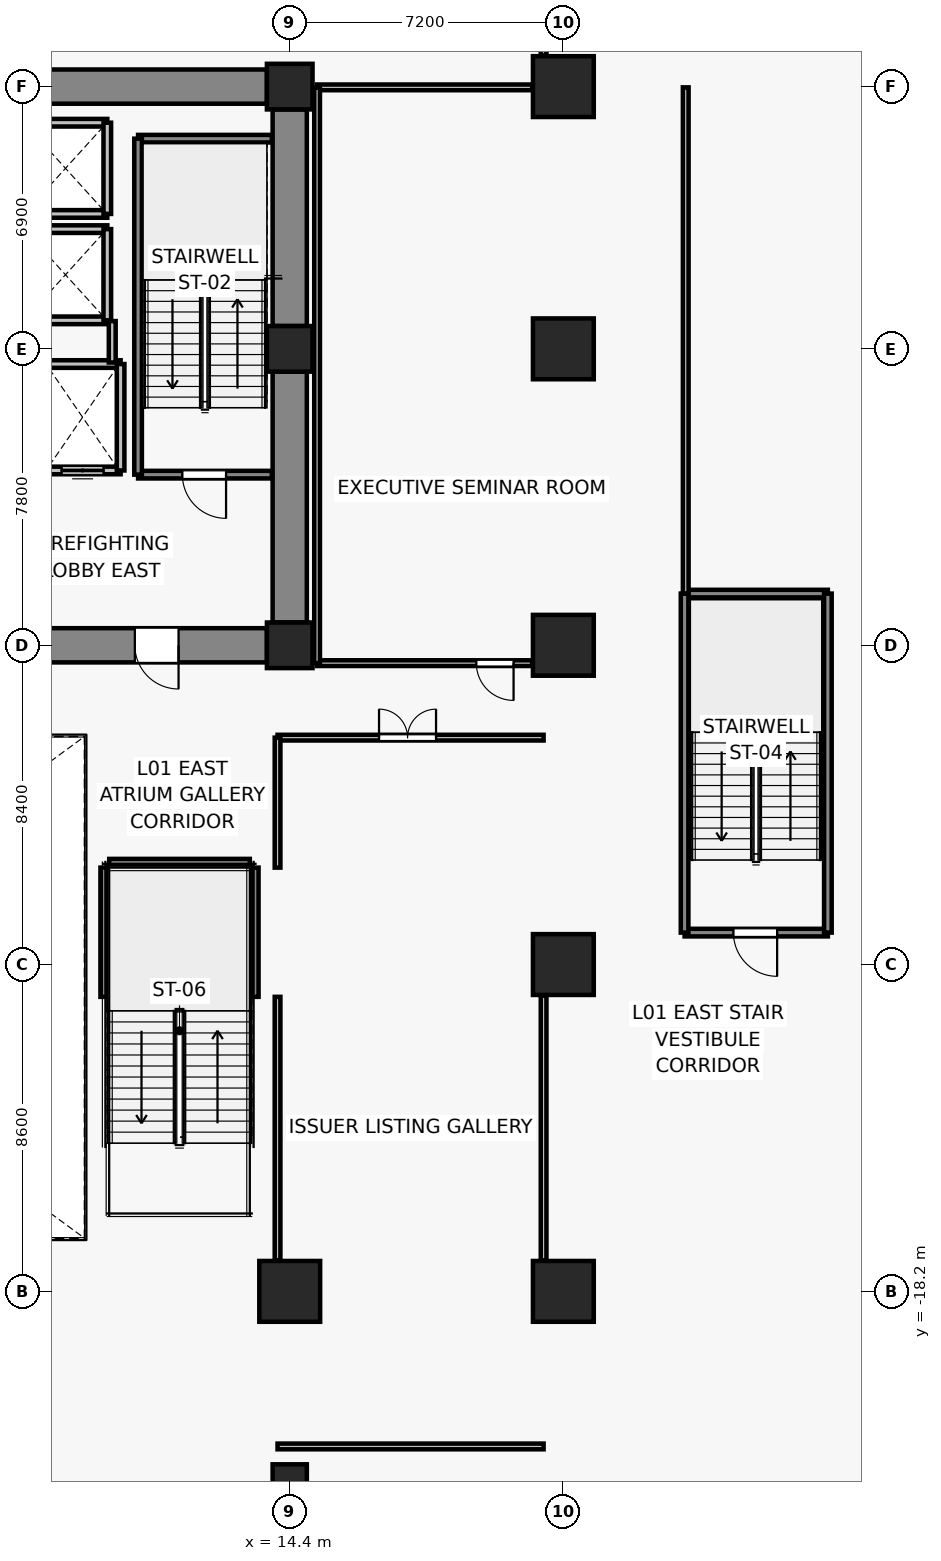
"""IFC4 building model, lengths in metres.
Left out: names, types, materials, properties, quantities, classifications, styles, units other than length and angle.
Written with IfcOpenShell. Run it as: python <this file> out.ifc"""

import sys

from ifc_helpers import new_model, si_unit, direction, frame, frame_2d, origin, origin_2d, place, context, subcontext, project, spatial, rectangle, extrude, source, transform, mapped, element, fill, save


model = new_model("IFC4")
c1 = context("Model", 3, precision=1e-05, world=origin(), true_north=direction((0.0, 1.0)))
c2 = subcontext(c1, "Body", "Model", "MODEL_VIEW")
j1 = project(units=[si_unit("LENGTHUNIT", "METRE"), si_unit("PLANEANGLEUNIT", "RADIAN")], contexts=[c1])
p1 = place(None, origin())
s1 = spatial("IfcSite", under=j1, at=p1, CompositionType="ELEMENT")
p2 = place(p1, origin())
s2 = spatial("IfcBuilding", under=s1, at=p2, CompositionType="ELEMENT")
p3 = place(p2, frame((0.0, 0.0, 5.0)))
s3 = spatial("IfcBuildingStorey", under=s2, at=p3, CompositionType="ELEMENT", Elevation=5.0)
for number, where, z_axis, x_axis in (
    (1, (14.4, -1.2, 0.0), (0.0, 0.0, 1.0), (1.0, 0.0, 0.0)),
    (2, (14.4, 6.6, 0.0), (0.0, 0.0, 1.0), (1.0, 0.0, 0.0)),
    (3, (14.4, 13.5, 0.0), (0.0, 0.0, 1.0), (1.0, 0.0, 0.0)),
):
    element("IfcColumn", number, at=place(p3, frame(where, z_axis=z_axis, x_axis=x_axis)), inside=s3, PredefinedType="COLUMN", context=c2, shape_type="SweptSolid", body=[
        extrude(rectangle(XDim=1.2, YDim=1.2, at=origin_2d()), origin(), (0.0, 0.0, 1.0), 4.4),
    ])
for number, where, z_axis, x_axis in (
    (4, (14.4, -18.2, 0.0), (0.0, 0.0, 1.0), (1.0, 0.0, 0.0)),
    (5, (21.6, -18.2, 0.0), (0.0, 0.0, 1.0), (1.0, 0.0, 0.0)),
    (6, (21.6, -9.6, 0.0), (0.0, 0.0, 1.0), (1.0, 0.0, 0.0)),
    (7, (21.6, -1.2, 0.0), (0.0, 0.0, 1.0), (1.0, 0.0, 0.0)),
    (8, (21.6, 6.6, 0.0), (0.0, 0.0, 1.0), (1.0, 0.0, 0.0)),
    (9, (21.6, 13.5, 0.0), (0.0, 0.0, 1.0), (1.0, 0.0, 0.0)),
):
    element("IfcColumn", number, at=place(p3, frame(where, z_axis=z_axis, x_axis=x_axis)), inside=s3, PredefinedType="COLUMN", context=c2, shape_type="SweptSolid", body=[
        extrude(rectangle(XDim=1.6, YDim=1.6, at=origin_2d()), origin(), (0.0, 0.0, 1.0), 4.4),
    ])
p4 = place(p3, frame((14.4, -23.2, 0.0), z_axis=(0.0, 0.0, 1.0), x_axis=(1.0, 0.0, 0.0)))
e10 = element("IfcColumn", 10, at=p4, inside=s3, PredefinedType="COLUMN", context=c2, shape_type="SweptSolid", body=[
    extrude(rectangle(XDim=0.9, YDim=0.9, at=origin_2d()), origin(), (0.0, 0.0, 1.0), 4.4),
])
p5 = place(p3, frame((7.8, 13.5, 0.0), z_axis=(0.0, 0.0, 1.0), x_axis=(1.0, 0.0, 0.0)))
e11 = element("IfcWall", 11, at=p5, inside=s3, PredefinedType="SHEAR", context=c2, shape_type="SweptSolid", body=[
    extrude(rectangle(XDim=6.0, YDim=0.9, at=frame_2d((3.0, 0.0))), origin(), (0.0, 0.0, 1.0), 4.1),
])
p6 = place(p3, frame((14.4, -0.6, 0.0), z_axis=(0.0, 0.0, 1.0), x_axis=(0.0, 1.0, 0.0)))
e12 = element("IfcWall", 12, at=p6, inside=s3, PredefinedType="SHEAR", context=c2, shape_type="SweptSolid", body=[
    extrude(rectangle(XDim=6.6, YDim=0.9, at=frame_2d((3.3, 0.0))), origin(), (0.0, 0.0, 1.0), 4.1),
])
p7 = place(p3, frame((14.4, 7.2, 0.0), z_axis=(0.0, 0.0, 1.0), x_axis=(0.0, 1.0, 0.0)))
e13 = element("IfcWall", 13, at=p7, inside=s3, PredefinedType="SHEAR", context=c2, shape_type="SweptSolid", body=[
    extrude(rectangle(XDim=5.7, YDim=0.9, at=frame_2d((2.85, 0.0))), origin(), (0.0, 0.0, 1.0), 4.1),
])
p8 = place(p3, frame((13.8, -1.2, 0.0), z_axis=(0.0, 0.0, 1.0), x_axis=(-1.0, 0.0, 0.0)))
e14 = element("IfcWall", 14, at=p8, inside=s3, PredefinedType="SHEAR", context=c2, shape_type="SweptSolid", body=[
    extrude(rectangle(XDim=6.0, YDim=0.9, at=frame_2d((3.0, 0.0))), origin(), (0.0, 0.0, 1.0), 4.1),
])
p9 = place(p8, frame((2.325, 0.0, 0.0)))
e15 = element("IfcOpeningElement", 15, at=p9, cuts=e14, PredefinedType="OPENING", context=c2, shape_type="SweptSolid", body=[
    extrude(rectangle(XDim=1.15, YDim=2.15, at=frame_2d((0.575, 1.075))), frame((0.0, 0.46, 0.0), z_axis=(0.0, -1.0, 0.0), x_axis=(1.0, 0.0, 0.0)), (0.0, 0.0, 1.0), 0.92),
])
for number, where, z_axis, x_axis in (
    (16, (9.52, -10.45, 0.0), (0.0, 0.0, 1.0), (0.0, 1.0, 0.0)),
    (17, (13.48, -7.05, 0.0), (0.0, 0.0, 1.0), (0.0, -1.0, 0.0)),
):
    element("IfcWall", number, at=place(p3, frame(where, z_axis=z_axis, x_axis=x_axis)), inside=s3, PredefinedType="SOLIDWALL", context=c2, shape_type="SweptSolid", body=[
        extrude(rectangle(XDim=3.4, YDim=0.2, at=frame_2d((1.7, 0.0))), origin(), (0.0, 0.0, 1.0), 4.1),
    ])
p10 = place(p3, frame((9.65, -6.92, 0.0), z_axis=(0.0, 0.0, 1.0), x_axis=(1.0, 0.0, 0.0)))
e18 = element("IfcWall", 18, at=p10, inside=s3, PredefinedType="SOLIDWALL", context=c2, shape_type="SweptSolid", body=[
    extrude(rectangle(XDim=3.7, YDim=0.2, at=frame_2d((1.85, 0.0))), origin(), (0.0, 0.0, 1.0), 4.1),
])
p11 = place(p3, frame((9.95, 3.4, 0.0), z_axis=(0.0, 0.0, 1.0), x_axis=(-1.0, 0.0, 0.0)))
e19 = element("IfcWall", 19, at=p11, inside=s3, PredefinedType="SOLIDWALL", context=c2, shape_type="SweptSolid", body=[
    extrude(rectangle(XDim=2.0, YDim=0.2, at=frame_2d((1.0, 0.0))), origin(), (0.0, 0.0, 1.0), 4.1),
])
p12 = place(p11, frame((0.45, 0.0, 0.0)))
e20 = element("IfcOpeningElement", 20, at=p12, cuts=e19, PredefinedType="OPENING", context=c2, shape_type="SweptSolid", body=[
    extrude(rectangle(XDim=1.1, YDim=2.2, at=frame_2d((0.55, 1.1))), frame((0.0, 0.11, 0.0), z_axis=(0.0, -1.0, 0.0), x_axis=(1.0, 0.0, 0.0)), (0.0, 0.0, 1.0), 0.22),
])
p13 = place(p3, frame((7.95, 6.2, 0.0), z_axis=(0.0, 0.0, 1.0), x_axis=(1.0, 0.0, 0.0)))
e21 = element("IfcWall", 21, at=p13, inside=s3, PredefinedType="SOLIDWALL", context=c2, shape_type="SweptSolid", body=[
    extrude(rectangle(XDim=2.0, YDim=0.2, at=frame_2d((1.0, 0.0))), origin(), (0.0, 0.0, 1.0), 4.1),
])
p14 = place(p3, frame((9.95, 6.2, 0.0), z_axis=(0.0, 0.0, 1.0), x_axis=(0.0, -1.0, 0.0)))
e22 = element("IfcWall", 22, at=p14, inside=s3, PredefinedType="SOLIDWALL", context=c2, shape_type="SweptSolid", body=[
    extrude(rectangle(XDim=2.8, YDim=0.2, at=frame_2d((1.4, 0.0))), origin(), (0.0, 0.0, 1.0), 4.1),
])
for number, where, z_axis, x_axis in (
    (23, (9.6, 7.35, 0.0), (0.0, 0.0, 1.0), (-1.0, 0.0, 0.0)),
    (24, (7.4, 9.75, 0.0), (0.0, 0.0, 1.0), (1.0, 0.0, 0.0)),
):
    element("IfcWall", number, at=place(p3, frame(where, z_axis=z_axis, x_axis=x_axis)), inside=s3, PredefinedType="SOLIDWALL", context=c2, shape_type="SweptSolid", body=[
        extrude(rectangle(XDim=2.2, YDim=0.2, at=frame_2d((1.1, 0.0))), origin(), (0.0, 0.0, 1.0), 3.19),
    ])
p15 = place(p3, frame((9.6, 9.75, 0.0), z_axis=(0.0, 0.0, 1.0), x_axis=(0.0, -1.0, 0.0)))
e25 = element("IfcWall", 25, at=p15, inside=s3, PredefinedType="SOLIDWALL", context=c2, shape_type="SweptSolid", body=[
    extrude(rectangle(XDim=2.4, YDim=0.2, at=frame_2d((1.2, 0.0))), origin(), (0.0, 0.0, 1.0), 4.1),
])
for number, where, z_axis, x_axis in (
    (26, (9.6, 10.15, 0.0), (0.0, 0.0, 1.0), (-1.0, 0.0, 0.0)),
    (27, (7.4, 12.55, 0.0), (0.0, 0.0, 1.0), (1.0, 0.0, 0.0)),
):
    element("IfcWall", number, at=place(p3, frame(where, z_axis=z_axis, x_axis=x_axis)), inside=s3, PredefinedType="SOLIDWALL", context=c2, shape_type="SweptSolid", body=[
        extrude(rectangle(XDim=2.2, YDim=0.2, at=frame_2d((1.1, 0.0))), origin(), (0.0, 0.0, 1.0), 3.19),
    ])
p16 = place(p3, frame((9.6, 12.55, 0.0), z_axis=(0.0, 0.0, 1.0), x_axis=(0.0, -1.0, 0.0)))
e28 = element("IfcWall", 28, at=p16, inside=s3, PredefinedType="SOLIDWALL", context=c2, shape_type="SweptSolid", body=[
    extrude(rectangle(XDim=2.4, YDim=0.2, at=frame_2d((1.2, 0.0))), origin(), (0.0, 0.0, 1.0), 4.1),
])
p17 = place(p3, frame((13.93, 3.29, 0.0), z_axis=(0.0, 0.0, 1.0), x_axis=(-1.0, 0.0, 0.0)))
e29 = element("IfcWall", 29, at=p17, inside=s3, PredefinedType="SOLIDWALL", context=c2, shape_type="SweptSolid", body=[
    extrude(rectangle(XDim=3.52, YDim=0.2, at=frame_2d((1.76, 0.0))), origin(), (0.0, 0.0, 1.0), 4.1),
])
p18 = place(p17, frame((1.205, 0.0, 0.0)))
e30 = element("IfcOpeningElement", 30, at=p18, cuts=e29, PredefinedType="OPENING", context=c2, shape_type="SweptSolid", body=[
    extrude(rectangle(XDim=1.15, YDim=2.15, at=frame_2d((0.575, 1.075))), frame((0.0, 0.11, 0.0), z_axis=(0.0, -1.0, 0.0), x_axis=(1.0, 0.0, 0.0)), (0.0, 0.0, 1.0), 0.22),
])
p19 = place(p3, frame((10.41, 12.13, 0.0), z_axis=(0.0, 0.0, 1.0), x_axis=(1.0, 0.0, 0.0)))
e31 = element("IfcWall", 31, at=p19, inside=s3, PredefinedType="SOLIDWALL", context=c2, shape_type="SweptSolid", body=[
    extrude(rectangle(XDim=3.52, YDim=0.2, at=frame_2d((1.76, 0.0))), origin(), (0.0, 0.0, 1.0), 4.1),
])
p20 = place(p3, frame((10.41, 3.29, 0.0), z_axis=(0.0, 0.0, 1.0), x_axis=(0.0, 1.0, 0.0)))
e32 = element("IfcWall", 32, at=p20, inside=s3, PredefinedType="SOLIDWALL", context=c2, shape_type="SweptSolid", body=[
    extrude(rectangle(XDim=8.84, YDim=0.2, at=frame_2d((4.42, 0.0))), origin(), (0.0, 0.0, 1.0), 4.1),
])
p21 = place(p3, frame((9.73, 7.33, 0.0), z_axis=(0.0, 0.0, 1.0), x_axis=(0.0, -1.0, 0.0)))
e33 = element("IfcWall", 33, at=p21, inside=s3, PredefinedType="PARTITIONING", context=c2, shape_type="SweptSolid", body=[
    extrude(rectangle(XDim=1.09, YDim=0.18, at=frame_2d((0.545, 0.0))), origin(), (0.0, 0.0, 1.0), 4.1),
])
p22 = place(p3, frame((28.56, -8.76, 0.0), z_axis=(0.0, 0.0, 1.0), x_axis=(-1.0, 0.0, 0.0)))
e34 = element("IfcWall", 34, at=p22, inside=s3, PredefinedType="SOLIDWALL", context=c2, shape_type="SweptSolid", body=[
    extrude(rectangle(XDim=3.77, YDim=0.2, at=frame_2d((1.885, 0.0))), origin(), (0.0, 0.0, 1.0), 4.1),
])
p23 = place(p22, frame((1.335, 0.0, 0.0)))
e35 = element("IfcOpeningElement", 35, at=p23, cuts=e34, PredefinedType="OPENING", context=c2, shape_type="SweptSolid", body=[
    extrude(rectangle(XDim=1.15, YDim=2.15, at=frame_2d((0.575, 1.075))), frame((0.0, 0.11, 0.0), z_axis=(0.0, -1.0, 0.0), x_axis=(1.0, 0.0, 0.0)), (0.0, 0.0, 1.0), 0.22),
])
p24 = place(p3, frame((24.79, 0.16, 0.0), z_axis=(0.0, 0.0, 1.0), x_axis=(1.0, 0.0, 0.0)))
e36 = element("IfcWall", 36, at=p24, inside=s3, PredefinedType="SOLIDWALL", context=c2, shape_type="SweptSolid", body=[
    extrude(rectangle(XDim=3.77, YDim=0.2, at=frame_2d((1.885, 0.0))), origin(), (0.0, 0.0, 1.0), 4.1),
])
for number, where, z_axis, x_axis in (
    (37, (24.79, -8.76, 0.0), (0.0, 0.0, 1.0), (0.0, 1.0, 0.0)),
    (38, (28.56, 0.16, 0.0), (0.0, 0.0, 1.0), (0.0, -1.0, 0.0)),
):
    element("IfcWall", number, at=place(p3, frame(where, z_axis=z_axis, x_axis=x_axis)), inside=s3, PredefinedType="SOLIDWALL", context=c2, shape_type="SweptSolid", body=[
        extrude(rectangle(XDim=8.92, YDim=0.2, at=frame_2d((4.46, 0.0))), origin(), (0.0, 0.0, 1.0), 4.1),
    ])
p25 = place(p3, frame((21.08, -22.28, 0.0), z_axis=(0.0, 0.0, 1.0), x_axis=(-1.0, 0.0, 0.0)))
e39 = element("IfcWall", 39, at=p25, inside=s3, PredefinedType="PARTITIONING", context=c2, shape_type="SweptSolid", body=[
    extrude(rectangle(XDim=7.0, YDim=0.15, at=frame_2d((3.5, 0.0))), origin(), (0.0, 0.0, 1.0), 3.19),
])
p26 = place(p3, frame((14.08, -3.63, 0.0), z_axis=(0.0, 0.0, 1.0), x_axis=(1.0, 0.0, 0.0)))
e40 = element("IfcWall", 40, at=p26, inside=s3, PredefinedType="PARTITIONING", context=c2, shape_type="SweptSolid", body=[
    extrude(rectangle(XDim=7.0, YDim=0.15, at=frame_2d((3.5, 0.0))), origin(), (0.0, 0.0, 1.0), 3.239),
])
p27 = place(p26, frame((2.67, 0.0, 0.0)))
e41 = element("IfcOpeningElement", 41, at=p27, cuts=e40, PredefinedType="OPENING", context=c2, shape_type="SweptSolid", body=[
    extrude(rectangle(XDim=1.5, YDim=2.2, at=frame_2d((0.75, 1.1))), frame((0.0, 0.085, 0.0), z_axis=(0.0, -1.0, 0.0), x_axis=(1.0, 0.0, 0.0)), (0.0, 0.0, 1.0), 0.17),
])
p28 = place(p3, frame((14.08, -17.38, 0.0), z_axis=(0.0, 0.0, 1.0), x_axis=(0.0, 1.0, 0.0)))
e42 = element("IfcWall", 42, at=p28, inside=s3, PredefinedType="PARTITIONING", context=c2, shape_type="SweptSolid", body=[
    extrude(rectangle(XDim=6.93, YDim=0.15, at=frame_2d((3.465, 0.0))), origin(), (0.0, 0.0, 1.0), 3.29),
])
p29 = place(p3, frame((14.08, -7.05, 0.0), z_axis=(0.0, 0.0, 1.0), x_axis=(0.0, 1.0, 0.0)))
e43 = element("IfcWall", 43, at=p29, inside=s3, PredefinedType="PARTITIONING", context=c2, shape_type="SweptSolid", body=[
    extrude(rectangle(XDim=3.42, YDim=0.15, at=frame_2d((1.71, 0.0))), origin(), (0.0, 0.0, 1.0), 3.29),
])
p30 = place(p3, frame((21.08, -10.42, 0.0), z_axis=(0.0, 0.0, 1.0), x_axis=(0.0, -1.0, 0.0)))
e44 = element("IfcWall", 44, at=p30, inside=s3, PredefinedType="PARTITIONING", context=c2, shape_type="SweptSolid", body=[
    extrude(rectangle(XDim=6.96, YDim=0.15, at=frame_2d((3.48, 0.0))), origin(), (0.0, 0.0, 1.0), 3.29),
])
p31 = place(p3, frame((20.78, -1.67, 0.0), z_axis=(0.0, 0.0, 1.0), x_axis=(-1.0, 0.0, 0.0)))
e45 = element("IfcWall", 45, at=p31, inside=s3, PredefinedType="PARTITIONING", context=c2, shape_type="SweptSolid", body=[
    extrude(rectangle(XDim=5.66, YDim=0.15, at=frame_2d((2.83, 0.0))), origin(), (0.0, 0.0, 1.0), 4.1),
])
p32 = place(p31, frame((0.49, 0.0, 0.0)))
e46 = element("IfcOpeningElement", 46, at=p32, cuts=e45, PredefinedType="OPENING", context=c2, shape_type="SweptSolid", body=[
    extrude(rectangle(XDim=0.98, YDim=2.15, at=frame_2d((0.49, 1.075))), frame((0.0, 0.085, 0.0), z_axis=(0.0, -1.0, 0.0), x_axis=(1.0, 0.0, 0.0)), (0.0, 0.0, 1.0), 0.17),
])
p33 = place(p3, frame((15.12, 13.48, 0.0), z_axis=(0.0, 0.0, 1.0), x_axis=(1.0, 0.0, 0.0)))
e47 = element("IfcWall", 47, at=p33, inside=s3, PredefinedType="PARTITIONING", context=c2, shape_type="SweptSolid", body=[
    extrude(rectangle(XDim=5.66, YDim=0.15, at=frame_2d((2.83, 0.0))), origin(), (0.0, 0.0, 1.0), 3.19),
])
p34 = place(p3, frame((15.12, -1.67, 0.0), z_axis=(0.0, 0.0, 1.0), x_axis=(0.0, 1.0, 0.0)))
e48 = element("IfcWall", 48, at=p34, inside=s3, PredefinedType="PARTITIONING", context=c2, shape_type="SweptSolid", body=[
    extrude(rectangle(XDim=15.15, YDim=0.15, at=frame_2d((7.575, 0.0))), origin(), (0.0, 0.0, 1.0), 3.19),
])
p35 = place(p3, frame((24.82, 13.48, 0.0), z_axis=(0.0, 0.0, 1.0), x_axis=(0.0, -1.0, 0.0)))
e49 = element("IfcWall", 49, at=p35, inside=s3, PredefinedType="PARTITIONING", context=c2, shape_type="SweptSolid", body=[
    extrude(rectangle(XDim=13.32, YDim=0.15, at=frame_2d((6.66, 0.0))), origin(), (0.0, 0.0, 1.0), 3.19),
])
p36 = place(p3, frame((21.08, 22.88, 0.0), z_axis=(0.0, 0.0, 1.0), x_axis=(0.0, -1.0, 0.0)))
e50 = element("IfcWall", 50, at=p36, inside=s3, PredefinedType="PARTITIONING", context=c2, shape_type="SweptSolid", body=[
    extrude(rectangle(XDim=8.56, YDim=0.15, at=frame_2d((4.28, 0.0))), origin(), (0.0, 0.0, 1.0), 3.19),
])
m1 = source(origin(), c2, "Body", "SweptSolid", [
    extrude(rectangle(XDim=1.1, YDim=2.2, at=frame_2d((0.55, 1.1))), frame((0.0, 0.025, 0.0), z_axis=(0.0, -1.0, 0.0), x_axis=(1.0, 0.0, 0.0)), (0.0, 0.0, 1.0), 0.05),
])
p37 = place(p12, origin())
e51 = element("IfcDoor", 51, at=p37, inside=s3, OperationType="DOUBLE_DOOR_SLIDING", PredefinedType="DOOR", context=c2, shape_type="MappedRepresentation", body=[
    mapped(m1, transform((0.0, 0.0, 0.0), x_axis=(1.0, 0.0, 0.0), y_axis=(0.0, 1.0, 0.0), z_axis=(0.0, 0.0, 1.0), scale=1.0)),
])
fill(e20, e51)
m2 = source(origin(), c2, "Body", "SweptSolid", [
    extrude(rectangle(XDim=1.15, YDim=2.15, at=frame_2d((0.575, 1.075))), frame((0.0, 0.025, 0.0), z_axis=(0.0, -1.0, 0.0), x_axis=(1.0, 0.0, 0.0)), (0.0, 0.0, 1.0), 0.05),
])
p38 = place(p18, origin())
e52 = element("IfcDoor", 52, at=p38, inside=s3, OperationType="SINGLE_SWING_LEFT", PredefinedType="DOOR", context=c2, shape_type="MappedRepresentation", body=[
    mapped(m2, transform((0.0, 0.0, 0.0), x_axis=(1.0, 0.0, 0.0), y_axis=(0.0, 1.0, 0.0), z_axis=(0.0, 0.0, 1.0), scale=1.0)),
])
fill(e30, e52)
p39 = place(p9, origin())
e53 = element("IfcDoor", 53, at=p39, inside=s3, OperationType="SINGLE_SWING_LEFT", PredefinedType="DOOR", context=c2, shape_type="MappedRepresentation", body=[
    mapped(m2, transform((0.0, 0.0, 0.0), x_axis=(1.0, 0.0, 0.0), y_axis=(0.0, 1.0, 0.0), z_axis=(0.0, 0.0, 1.0), scale=1.0)),
])
fill(e15, e53)
p40 = place(p23, origin())
e54 = element("IfcDoor", 54, at=p40, inside=s3, OperationType="SINGLE_SWING_LEFT", PredefinedType="DOOR", context=c2, shape_type="MappedRepresentation", body=[
    mapped(m2, transform((0.0, 0.0, 0.0), x_axis=(1.0, 0.0, 0.0), y_axis=(0.0, 1.0, 0.0), z_axis=(0.0, 0.0, 1.0), scale=1.0)),
])
fill(e35, e54)
m3 = source(origin(), c2, "Body", "SweptSolid", [
    extrude(rectangle(XDim=1.5, YDim=2.2, at=frame_2d((0.75, 1.1))), frame((0.0, 0.025, 0.0), z_axis=(0.0, -1.0, 0.0), x_axis=(1.0, 0.0, 0.0)), (0.0, 0.0, 1.0), 0.05),
])
p41 = place(p27, origin())
e55 = element("IfcDoor", 55, at=p41, inside=s3, OperationType="DOUBLE_DOOR_SINGLE_SWING", PredefinedType="DOOR", context=c2, shape_type="MappedRepresentation", body=[
    mapped(m3, transform((0.0, 0.0, 0.0), x_axis=(1.0, 0.0, 0.0), y_axis=(0.0, 1.0, 0.0), z_axis=(0.0, 0.0, 1.0), scale=1.0)),
])
fill(e41, e55)
m4 = source(origin(), c2, "Body", "SweptSolid", [
    extrude(rectangle(XDim=0.98, YDim=2.15, at=frame_2d((0.49, 1.075))), frame((0.0, 0.025, 0.0), z_axis=(0.0, -1.0, 0.0), x_axis=(1.0, 0.0, 0.0)), (0.0, 0.0, 1.0), 0.05),
])
p42 = place(p32, origin())
e56 = element("IfcDoor", 56, at=p42, inside=s3, OperationType="SINGLE_SWING_LEFT", PredefinedType="DOOR", context=c2, shape_type="MappedRepresentation", body=[
    mapped(m4, transform((0.0, 0.0, 0.0), x_axis=(1.0, 0.0, 0.0), y_axis=(0.0, 1.0, 0.0), z_axis=(0.0, 0.0, 1.0), scale=1.0)),
])
fill(e46, e56)
save(model, sys.argv[1])
